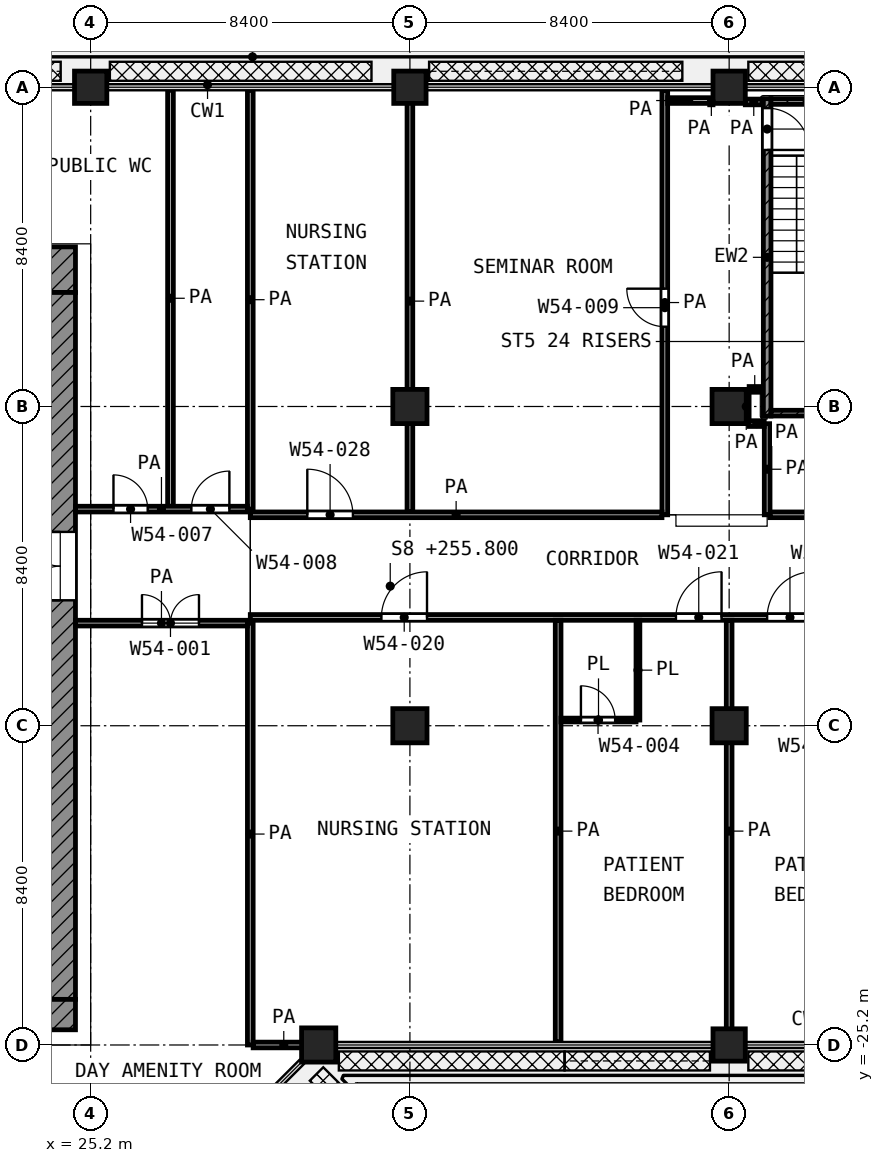
"""IFC4 building model, lengths in metres.
Left out: names, types, materials, properties, quantities, classifications, styles, units other than length and angle.
Written with IfcOpenShell. Run it as: python <this file> out.ifc"""

import sys

from ifc_helpers import new_model, si_unit, direction, frame, frame_2d, origin, origin_2d, place, context, subcontext, project, spatial, rectangle, extrude, element, fill, save


model = new_model("IFC4")
c1 = context("Model", 3, precision=1e-05, world=origin(), true_north=direction((0.0, 1.0)))
c2 = subcontext(c1, "Body", "Model", "MODEL_VIEW")
j1 = project(units=[si_unit("LENGTHUNIT", "METRE"), si_unit("PLANEANGLEUNIT", "RADIAN")], contexts=[c1])
p1 = place(None, origin())
s1 = spatial("IfcSite", under=j1, at=p1, CompositionType="ELEMENT")
p2 = place(p1, origin())
s2 = spatial("IfcBuilding", under=s1, at=p2, CompositionType="ELEMENT")
p3 = place(p2, frame((0.0, 0.0, 255.8)))
s3 = spatial("IfcBuildingStorey", under=s2, at=p3, CompositionType="ELEMENT", Elevation=255.8)
for number, where, z_axis, x_axis in (
    (1, (25.2, 0.0, 0.0), (0.0, 0.0, 1.0), (1.0, 0.0, 0.0)),
    (2, (33.6, 0.0, 0.0), (0.0, 0.0, 1.0), (1.0, 0.0, 0.0)),
    (3, (42.0, 0.0, 0.0), (0.0, 0.0, 1.0), (1.0, 0.0, 0.0)),
):
    element("IfcColumn", number, at=place(p3, frame(where, z_axis=z_axis, x_axis=x_axis)), inside=s3, PredefinedType="COLUMN", context=c2, shape_type="SweptSolid", body=[
        extrude(rectangle(XDim=0.85, YDim=0.85, at=origin_2d()), origin(), (0.0, 0.0, 1.0), 4.2),
    ])
for number, where, z_axis, x_axis in (
    (4, (33.6, -8.4, 0.0), (0.0, 0.0, 1.0), (1.0, 0.0, 0.0)),
    (5, (42.0, -8.4, 0.0), (0.0, 0.0, 1.0), (1.0, 0.0, 0.0)),
    (6, (33.6, -16.8, 0.0), (0.0, 0.0, 1.0), (1.0, 0.0, 0.0)),
    (7, (42.0, -16.8, 0.0), (0.0, 0.0, 1.0), (1.0, 0.0, 0.0)),
    (8, (31.2, -25.2, 0.0), (0.0, 0.0, 1.0), (1.0, 0.0, 0.0)),
):
    element("IfcColumn", number, at=place(p3, frame(where, z_axis=z_axis, x_axis=x_axis)), inside=s3, PredefinedType="COLUMN", context=c2, shape_type="SweptSolid", body=[
        extrude(rectangle(XDim=0.9, YDim=0.9, at=origin_2d()), origin(), (0.0, 0.0, 1.0), 4.2),
    ])
p4 = place(p3, frame((42.0, -25.2, 0.0), z_axis=(0.0, 0.0, 1.0), x_axis=(1.0, 0.0, 0.0)))
e9 = element("IfcColumn", 9, at=p4, inside=s3, PredefinedType="COLUMN", context=c2, shape_type="SweptSolid", body=[
    extrude(rectangle(XDim=0.85, YDim=0.85, at=origin_2d()), origin(), (0.0, 0.0, 1.0), 4.2),
])
p5 = place(p3, frame((4.2, -4.8, 0.0), z_axis=(0.0, 0.0, 1.0), x_axis=(1.0, 0.0, 0.0)))
e10 = element("IfcWall", 10, at=p5, inside=s3, PredefinedType="SHEAR", context=c2, shape_type="SweptSolid", body=[
    extrude(rectangle(XDim=20.6, YDim=1.2, at=frame_2d((10.3, 0.0))), origin(), (0.0, 0.0, 1.0), 3.6),
])
p6 = place(p5, frame((1.95, 0.0, 0.0)))
e11 = element("IfcOpeningElement", 11, at=p6, cuts=e10, PredefinedType="OPENING", context=c2, shape_type="SweptSolid", body=[
    extrude(rectangle(XDim=1.1, YDim=2.1, at=frame_2d((0.55, 1.05))), frame((0.0, 0.61, 0.0), z_axis=(0.0, -1.0, 0.0), x_axis=(1.0, 0.0, 0.0)), (0.0, 0.0, 1.0), 1.22),
])
p7 = place(p5, frame((17.95, 0.0, 0.0)))
e12 = element("IfcOpeningElement", 12, at=p7, cuts=e10, PredefinedType="OPENING", context=c2, shape_type="SweptSolid", body=[
    extrude(rectangle(XDim=1.1, YDim=2.1, at=frame_2d((0.55, 1.05))), frame((0.0, 0.61, 0.0), z_axis=(0.0, -1.0, 0.0), x_axis=(1.0, 0.0, 0.0)), (0.0, 0.0, 1.0), 1.22),
])
p8 = place(p3, frame((24.4, -24.0, 0.0), z_axis=(0.0, 0.0, 1.0), x_axis=(0.0, 1.0, 0.0)))
e13 = element("IfcWall", 13, at=p8, inside=s3, PredefinedType="SHEAR", context=c2, shape_type="SweptSolid", body=[
    extrude(rectangle(XDim=18.6, YDim=0.8, at=frame_2d((9.3, 0.0))), origin(), (0.0, 0.0, 1.0), 3.6),
])
p9 = place(p8, frame((10.5, 0.0, 0.0)))
e14 = element("IfcOpeningElement", 14, at=p9, cuts=e13, PredefinedType="OPENING", context=c2, shape_type="SweptSolid", body=[
    extrude(rectangle(XDim=1.8, YDim=2.1, at=frame_2d((0.9, 1.05))), frame((0.0, 0.41, 0.0), z_axis=(0.0, -1.0, 0.0), x_axis=(1.0, 0.0, 0.0)), (0.0, 0.0, 1.0), 0.82),
])
p10 = place(p3, frame((24.4, -24.8, 0.0), z_axis=(0.0, 0.0, 1.0), x_axis=(0.0, 1.0, 0.0)))
e15 = element("IfcWall", 15, at=p10, inside=s3, PredefinedType="SHEAR", context=c2, shape_type="SweptSolid", body=[
    extrude(rectangle(XDim=0.8, YDim=0.8, at=frame_2d((0.4, 0.0))), origin(), (0.0, 0.0, 1.0), 3.6),
])
p11 = place(p3, frame((43.0, -8.65, 0.0), z_axis=(0.0, 0.0, 1.0), x_axis=(0.0, 1.0, 0.0)))
e16 = element("IfcWall", 16, at=p11, inside=s3, PredefinedType="SHEAR", context=c2, shape_type="SweptSolid", body=[
    extrude(rectangle(XDim=8.35, YDim=0.2, at=frame_2d((4.175, 0.0))), origin(), (0.0, 0.0, 1.0), 3.6),
])
p12 = place(p11, frame((7.0, 0.0, 0.0)))
e17 = element("IfcOpeningElement", 17, at=p12, cuts=e16, PredefinedType="OPENING", context=c2, shape_type="SweptSolid", body=[
    extrude(rectangle(XDim=1.1, YDim=2.1, at=frame_2d((0.55, 1.05))), frame((0.0, 0.11, 0.0), z_axis=(0.0, -1.0, 0.0), x_axis=(1.0, 0.0, 0.0)), (0.0, 0.0, 1.0), 0.22),
])
for number, where, z_axis, x_axis in (
    (18, (43.1, -0.375, 0.0), (0.0, 0.0, 1.0), (1.0, 0.0, 0.0)),
    (19, (43.1, -8.575, 0.0), (0.0, 0.0, 1.0), (1.0, 0.0, 0.0)),
):
    element("IfcWall", number, at=place(p3, frame(where, z_axis=z_axis, x_axis=x_axis)), inside=s3, PredefinedType="SHEAR", context=c2, shape_type="SweptSolid", body=[
        extrude(rectangle(XDim=2.85, YDim=0.15, at=frame_2d((1.425, 0.0))), origin(), (0.0, 0.0, 1.0), 3.6),
    ])
p13 = place(p3, frame((37.575, -16.65, 0.0), z_axis=(0.0, 0.0, 1.0), x_axis=(1.0, 0.0, 0.0)))
e20 = element("IfcWall", 20, at=p13, inside=s3, PredefinedType="PARTITIONING", context=c2, shape_type="SweptSolid", body=[
    extrude(rectangle(XDim=1.975, YDim=0.1, at=frame_2d((0.988, 0.0))), origin(), (0.0, 0.0, 1.0), 3.6),
])
p14 = place(p13, frame((0.525, 0.0, 0.0)))
e21 = element("IfcOpeningElement", 21, at=p14, cuts=e20, PredefinedType="OPENING", context=c2, shape_type="SweptSolid", body=[
    extrude(rectangle(XDim=0.9, YDim=2.1, at=frame_2d((0.45, 1.05))), frame((0.0, 0.06, 0.0), z_axis=(0.0, -1.0, 0.0), x_axis=(1.0, 0.0, 0.0)), (0.0, 0.0, 1.0), 0.12),
])
p15 = place(p3, frame((39.6, -16.65, 0.0), z_axis=(0.0, 0.0, 1.0), x_axis=(0.0, 1.0, 0.0)))
e22 = element("IfcWall", 22, at=p15, inside=s3, PredefinedType="PARTITIONING", context=c2, shape_type="SweptSolid", body=[
    extrude(rectangle(XDim=2.625, YDim=0.1, at=frame_2d((1.312, 0.0))), origin(), (0.0, 0.0, 1.0), 3.6),
])
p16 = place(p3, frame((29.475, -25.2, 0.0), z_axis=(0.0, 0.0, 1.0), x_axis=(1.0, 0.0, 0.0)))
e23 = element("IfcWall", 23, at=p16, inside=s3, PredefinedType="PARTITIONING", context=c2, shape_type="SweptSolid", body=[
    extrude(rectangle(XDim=1.612, YDim=0.15, at=frame_2d((0.806, 0.0))), origin(), (0.0, 0.0, 1.0), 3.6),
])
p17 = place(p3, frame((24.8, -14.1, 0.0), z_axis=(0.0, 0.0, 1.0), x_axis=(1.0, 0.0, 0.0)))
e24 = element("IfcWall", 24, at=p17, inside=s3, PredefinedType="PARTITIONING", context=c2, shape_type="SweptSolid", body=[
    extrude(rectangle(XDim=4.525, YDim=0.15, at=frame_2d((2.262, 0.0))), origin(), (0.0, 0.0, 1.0), 3.6),
])
p18 = place(p17, frame((1.75, 0.0, 0.0)))
e25 = element("IfcOpeningElement", 25, at=p18, cuts=e24, PredefinedType="OPENING", context=c2, shape_type="SweptSolid", body=[
    extrude(rectangle(XDim=1.5, YDim=2.1, at=frame_2d((0.75, 1.05))), frame((0.0, 0.085, 0.0), z_axis=(0.0, -1.0, 0.0), x_axis=(1.0, 0.0, 0.0)), (0.0, 0.0, 1.0), 0.17),
])
p19 = place(p3, frame((29.4, -13.95, 0.0), z_axis=(0.0, 0.0, 1.0), x_axis=(1.0, 0.0, 0.0)))
e26 = element("IfcWall", 26, at=p19, inside=s3, PredefinedType="PARTITIONING", context=c2, shape_type="SweptSolid", body=[
    extrude(rectangle(XDim=33.52, YDim=0.15, at=frame_2d((16.76, 0.0))), origin(), (0.0, 0.0, 1.0), 2.7),
])
p20 = place(p19, frame((3.45, 0.0, 0.0)))
e27 = element("IfcOpeningElement", 27, at=p20, cuts=e26, PredefinedType="OPENING", context=c2, shape_type="SweptSolid", body=[
    extrude(rectangle(XDim=1.2, YDim=2.1, at=frame_2d((0.6, 1.05))), frame((0.0, 0.085, 0.0), z_axis=(0.0, -1.0, 0.0), x_axis=(1.0, 0.0, 0.0)), (0.0, 0.0, 1.0), 0.17),
])
p21 = place(p19, frame((11.2, 0.0, 0.0)))
e28 = element("IfcOpeningElement", 28, at=p21, cuts=e26, PredefinedType="OPENING", context=c2, shape_type="SweptSolid", body=[
    extrude(rectangle(XDim=1.2, YDim=2.1, at=frame_2d((0.6, 1.05))), frame((0.0, 0.085, 0.0), z_axis=(0.0, -1.0, 0.0), x_axis=(1.0, 0.0, 0.0)), (0.0, 0.0, 1.0), 0.17),
])
p22 = place(p19, frame((13.6, 0.0, 0.0)))
e29 = element("IfcOpeningElement", 29, at=p22, cuts=e26, PredefinedType="OPENING", context=c2, shape_type="SweptSolid", body=[
    extrude(rectangle(XDim=1.2, YDim=2.1, at=frame_2d((0.6, 1.05))), frame((0.0, 0.085, 0.0), z_axis=(0.0, -1.0, 0.0), x_axis=(1.0, 0.0, 0.0)), (0.0, 0.0, 1.0), 0.17),
])
p23 = place(p19, frame((21.075, 0.0, 0.0)))
e30 = element("IfcOpeningElement", 30, at=p23, cuts=e26, PredefinedType="OPENING", context=c2, shape_type="SweptSolid", body=[
    extrude(rectangle(XDim=1.2, YDim=2.1, at=frame_2d((0.6, 1.05))), frame((0.0, 0.085, 0.0), z_axis=(0.0, -1.0, 0.0), x_axis=(1.0, 0.0, 0.0)), (0.0, 0.0, 1.0), 0.17),
])
p24 = place(p19, frame((19.55, 0.0, 0.0)))
e31 = element("IfcOpeningElement", 31, at=p24, cuts=e26, PredefinedType="OPENING", context=c2, shape_type="SweptSolid", body=[
    extrude(rectangle(XDim=1.2, YDim=2.1, at=frame_2d((0.6, 1.05))), frame((0.0, 0.085, 0.0), z_axis=(0.0, -1.0, 0.0), x_axis=(1.0, 0.0, 0.0)), (0.0, 0.0, 1.0), 0.17),
])
p25 = place(p19, frame((22.95, 0.0, 0.0)))
e32 = element("IfcOpeningElement", 32, at=p25, cuts=e26, PredefinedType="OPENING", context=c2, shape_type="SweptSolid", body=[
    extrude(rectangle(XDim=1.2, YDim=2.1, at=frame_2d((0.6, 1.05))), frame((0.0, 0.085, 0.0), z_axis=(0.0, -1.0, 0.0), x_axis=(1.0, 0.0, 0.0)), (0.0, 0.0, 1.0), 0.17),
])
p26 = place(p19, frame((28.35, 0.0, 0.0)))
e33 = element("IfcOpeningElement", 33, at=p26, cuts=e26, PredefinedType="OPENING", context=c2, shape_type="SweptSolid", body=[
    extrude(rectangle(XDim=1.5, YDim=2.1, at=frame_2d((0.75, 1.05))), frame((0.0, 0.085, 0.0), z_axis=(0.0, -1.0, 0.0), x_axis=(1.0, 0.0, 0.0)), (0.0, 0.0, 1.0), 0.17),
])
p27 = place(p3, frame((29.4, -11.25, 0.0), z_axis=(0.0, 0.0, 1.0), x_axis=(1.0, 0.0, 0.0)))
e34 = element("IfcWall", 34, at=p27, inside=s3, PredefinedType="PARTITIONING", context=c2, shape_type="SweptSolid", body=[
    extrude(rectangle(XDim=10.832, YDim=0.15, at=frame_2d((5.416, 0.0))), origin(), (0.0, 0.0, 1.0), 3.6),
])
p28 = place(p27, frame((1.5, 0.0, 0.0)))
e35 = element("IfcOpeningElement", 35, at=p28, cuts=e34, PredefinedType="OPENING", context=c2, shape_type="SweptSolid", body=[
    extrude(rectangle(XDim=1.2, YDim=2.1, at=frame_2d((0.6, 1.05))), frame((0.0, 0.085, 0.0), z_axis=(0.0, -1.0, 0.0), x_axis=(1.0, 0.0, 0.0)), (0.0, 0.0, 1.0), 0.17),
])
p29 = place(p3, frame((43.075, -11.25, 0.0), z_axis=(0.0, 0.0, 1.0), x_axis=(1.0, 0.0, 0.0)))
e36 = element("IfcWall", 36, at=p29, inside=s3, PredefinedType="PARTITIONING", context=c2, shape_type="SweptSolid", body=[
    extrude(rectangle(XDim=5.375, YDim=0.15, at=frame_2d((2.688, 0.0))), origin(), (0.0, 0.0, 1.0), 3.6),
])
p30 = place(p29, frame((2.188, 0.0, 0.0)))
e37 = element("IfcOpeningElement", 37, at=p30, cuts=e36, PredefinedType="OPENING", context=c2, shape_type="SweptSolid", body=[
    extrude(rectangle(XDim=1.0, YDim=2.1, at=frame_2d((0.5, 1.05))), frame((0.0, 0.085, 0.0), z_axis=(0.0, -1.0, 0.0), x_axis=(1.0, 0.0, 0.0)), (0.0, 0.0, 1.0), 0.17),
])
p31 = place(p3, frame((24.8, -11.1, 0.0), z_axis=(0.0, 0.0, 1.0), x_axis=(1.0, 0.0, 0.0)))
e38 = element("IfcWall", 38, at=p31, inside=s3, PredefinedType="PARTITIONING", context=c2, shape_type="SweptSolid", body=[
    extrude(rectangle(XDim=4.525, YDim=0.15, at=frame_2d((2.262, 0.0))), origin(), (0.0, 0.0, 1.0), 3.6),
])
p32 = place(p31, frame((1.0, 0.0, 0.0)))
e39 = element("IfcOpeningElement", 39, at=p32, cuts=e38, PredefinedType="OPENING", context=c2, shape_type="SweptSolid", body=[
    extrude(rectangle(XDim=0.9, YDim=2.1, at=frame_2d((0.45, 1.05))), frame((0.0, 0.085, 0.0), z_axis=(0.0, -1.0, 0.0), x_axis=(1.0, 0.0, 0.0)), (0.0, 0.0, 1.0), 0.17),
])
p33 = place(p31, frame((3.05, 0.0, 0.0)))
e40 = element("IfcOpeningElement", 40, at=p33, cuts=e38, PredefinedType="OPENING", context=c2, shape_type="SweptSolid", body=[
    extrude(rectangle(XDim=1.0, YDim=2.1, at=frame_2d((0.5, 1.05))), frame((0.0, 0.085, 0.0), z_axis=(0.0, -1.0, 0.0), x_axis=(1.0, 0.0, 0.0)), (0.0, 0.0, 1.0), 0.17),
])
p34 = place(p3, frame((42.525, -8.85, 0.0), z_axis=(0.0, 0.0, 1.0), x_axis=(1.0, 0.0, 0.0)))
e41 = element("IfcWall", 41, at=p34, inside=s3, PredefinedType="PARTITIONING", context=c2, shape_type="SweptSolid", body=[
    extrude(rectangle(XDim=0.398, YDim=0.15, at=frame_2d((0.199, 0.0))), origin(), (0.0, 0.0, 1.0), 3.6),
])
p35 = place(p3, frame((42.526, -7.95, 0.0), z_axis=(0.0, 0.0, 1.0), x_axis=(1.0, 0.0, 0.0)))
e42 = element("IfcWall", 42, at=p35, inside=s3, PredefinedType="PARTITIONING", context=c2, shape_type="SweptSolid", body=[
    extrude(rectangle(XDim=0.294, YDim=0.15, at=frame_2d((0.147, 0.0))), origin(), (0.0, 0.0, 1.0), 3.6),
])
p36 = place(p3, frame((41.488, -0.387, 0.0), z_axis=(0.0, 0.0, 1.0), x_axis=(1.0, 0.0, 0.0)))
e43 = element("IfcWall", 43, at=p36, inside=s3, PredefinedType="PARTITIONING", context=c2, shape_type="SweptSolid", body=[
    extrude(rectangle(XDim=0.087, YDim=0.15, at=frame_2d((0.043, 0.0))), origin(), (0.0, 0.0, 1.0), 3.6),
])
p37 = place(p3, frame((42.425, -0.387, 0.0), z_axis=(0.0, 0.0, 1.0), x_axis=(1.0, 0.0, 0.0)))
e44 = element("IfcWall", 44, at=p37, inside=s3, PredefinedType="PARTITIONING", context=c2, shape_type="SweptSolid", body=[
    extrude(rectangle(XDim=0.445, YDim=0.15, at=frame_2d((0.223, 0.0))), origin(), (0.0, 0.0, 1.0), 3.6),
])
p38 = place(p3, frame((40.382, -0.35, 0.0), z_axis=(0.0, 0.0, 1.0), x_axis=(1.0, 0.0, 0.0)))
e45 = element("IfcWall", 45, at=p38, inside=s3, PredefinedType="PARTITIONING", context=c2, shape_type="SweptSolid", body=[
    extrude(rectangle(XDim=1.106, YDim=0.15, at=frame_2d((0.553, 0.0))), origin(), (0.0, 0.0, 1.0), 3.6),
])
p39 = place(p3, frame((27.3, -11.025, 0.0), z_axis=(0.0, 0.0, 1.0), x_axis=(0.0, 1.0, 0.0)))
e46 = element("IfcWall", 46, at=p39, inside=s3, PredefinedType="PARTITIONING", context=c2, shape_type="SweptSolid", body=[
    extrude(rectangle(XDim=10.945, YDim=0.15, at=frame_2d((5.472, 0.0))), origin(), (0.0, 0.0, 1.0), 3.6),
])
p40 = place(p3, frame((29.4, -25.2, 0.0), z_axis=(0.0, 0.0, 1.0), x_axis=(0.0, 1.0, 0.0)))
e47 = element("IfcWall", 47, at=p40, inside=s3, PredefinedType="PARTITIONING", context=c2, shape_type="SweptSolid", body=[
    extrude(rectangle(XDim=11.1, YDim=0.15, at=frame_2d((5.55, 0.0))), origin(), (0.0, 0.0, 1.0), 3.6),
])
p41 = place(p3, frame((29.4, -11.1, 0.0), z_axis=(0.0, 0.0, 1.0), x_axis=(0.0, 1.0, 0.0)))
e48 = element("IfcWall", 48, at=p41, inside=s3, PredefinedType="PARTITIONING", context=c2, shape_type="SweptSolid", body=[
    extrude(rectangle(XDim=11.02, YDim=0.15, at=frame_2d((5.51, 0.0))), origin(), (0.0, 0.0, 1.0), 3.6),
])
p42 = place(p3, frame((33.6, -11.175, 0.0), z_axis=(0.0, 0.0, 1.0), x_axis=(0.0, 1.0, 0.0)))
e49 = element("IfcWall", 49, at=p42, inside=s3, PredefinedType="PARTITIONING", context=c2, shape_type="SweptSolid", body=[
    extrude(rectangle(XDim=11.095, YDim=0.15, at=frame_2d((5.547, 0.0))), origin(), (0.0, 0.0, 1.0), 3.6),
])
p43 = place(p3, frame((37.5, -25.12, 0.0), z_axis=(0.0, 0.0, 1.0), x_axis=(0.0, 1.0, 0.0)))
e50 = element("IfcWall", 50, at=p43, inside=s3, PredefinedType="PARTITIONING", context=c2, shape_type="SweptSolid", body=[
    extrude(rectangle(XDim=11.095, YDim=0.15, at=frame_2d((5.548, 0.0))), origin(), (0.0, 0.0, 1.0), 3.6),
])
p44 = place(p3, frame((40.307, -11.25, 0.0), z_axis=(0.0, 0.0, 1.0), x_axis=(0.0, 1.0, 0.0)))
e51 = element("IfcWall", 51, at=p44, inside=s3, PredefinedType="PARTITIONING", context=c2, shape_type="SweptSolid", body=[
    extrude(rectangle(XDim=11.17, YDim=0.15, at=frame_2d((5.585, 0.0))), origin(), (0.0, 0.0, 1.0), 3.6),
])
p45 = place(p44, frame((4.95, 0.0, 0.0)))
e52 = element("IfcOpeningElement", 52, at=p45, cuts=e51, PredefinedType="OPENING", context=c2, shape_type="SweptSolid", body=[
    extrude(rectangle(XDim=1.0, YDim=2.1, at=frame_2d((0.5, 1.05))), frame((0.0, 0.085, 0.0), z_axis=(0.0, -1.0, 0.0), x_axis=(1.0, 0.0, 0.0)), (0.0, 0.0, 1.0), 0.17),
])
p46 = place(p3, frame((42.0, -25.12, 0.0), z_axis=(0.0, 0.0, 1.0), x_axis=(0.0, 1.0, 0.0)))
e53 = element("IfcWall", 53, at=p46, inside=s3, PredefinedType="PARTITIONING", context=c2, shape_type="SweptSolid", body=[
    extrude(rectangle(XDim=11.095, YDim=0.15, at=frame_2d((5.548, 0.0))), origin(), (0.0, 0.0, 1.0), 3.6),
])
p47 = place(p3, frame((42.45, -8.85, 0.0), z_axis=(0.0, 0.0, 1.0), x_axis=(0.0, 1.0, 0.0)))
e54 = element("IfcWall", 54, at=p47, inside=s3, PredefinedType="PARTITIONING", context=c2, shape_type="SweptSolid", body=[
    extrude(rectangle(XDim=0.899, YDim=0.15, at=frame_2d((0.45, 0.0))), origin(), (0.0, 0.0, 1.0), 3.6),
])
p48 = place(p3, frame((43.0, -11.25, 0.0), z_axis=(0.0, 0.0, 1.0), x_axis=(0.0, 1.0, 0.0)))
e55 = element("IfcWall", 55, at=p48, inside=s3, PredefinedType="PARTITIONING", context=c2, shape_type="SweptSolid", body=[
    extrude(rectangle(XDim=2.398, YDim=0.15, at=frame_2d((1.199, 0.0))), origin(), (0.0, 0.0, 1.0), 3.6),
])
p49 = place(p9, origin())
e56 = element("IfcDoor", 56, at=p49, inside=s3, OperationType="DOUBLE_DOOR_SINGLE_SWING", PredefinedType="DOOR", context=c2, shape_type="SweptSolid", body=[
    extrude(rectangle(XDim=1.8, YDim=2.1, at=frame_2d((0.9, 1.05))), frame((0.0, 0.025, 0.0), z_axis=(0.0, -1.0, 0.0), x_axis=(1.0, 0.0, 0.0)), (0.0, 0.0, 1.0), 0.05),
])
fill(e14, e56)
p50 = place(p12, frame((1.1, 0.0, 0.0), z_axis=(0.0, 0.0, 1.0), x_axis=(-1.0, 0.0, 0.0)))
e57 = element("IfcDoor", 57, at=p50, inside=s3, OperationType="SINGLE_SWING_LEFT", PredefinedType="DOOR", context=c2, shape_type="SweptSolid", body=[
    extrude(rectangle(XDim=1.1, YDim=2.1, at=frame_2d((0.55, 1.05))), frame((0.0, 0.025, 0.0), z_axis=(0.0, -1.0, 0.0), x_axis=(1.0, 0.0, 0.0)), (0.0, 0.0, 1.0), 0.05),
])
fill(e17, e57)
p51 = place(p18, origin())
e58 = element("IfcDoor", 58, at=p51, inside=s3, OperationType="DOUBLE_DOOR_SINGLE_SWING", PredefinedType="DOOR", context=c2, shape_type="SweptSolid", body=[
    extrude(rectangle(XDim=1.5, YDim=2.1, at=frame_2d((0.75, 1.05))), frame((0.0, 0.025, 0.0), z_axis=(0.0, -1.0, 0.0), x_axis=(1.0, 0.0, 0.0)), (0.0, 0.0, 1.0), 0.05),
])
fill(e25, e58)
p52 = place(p45, origin())
e59 = element("IfcDoor", 59, at=p52, inside=s3, OperationType="SINGLE_SWING_RIGHT", PredefinedType="DOOR", context=c2, shape_type="SweptSolid", body=[
    extrude(rectangle(XDim=1.0, YDim=2.1, at=frame_2d((0.5, 1.05))), frame((0.0, 0.025, 0.0), z_axis=(0.0, -1.0, 0.0), x_axis=(1.0, 0.0, 0.0)), (0.0, 0.0, 1.0), 0.05),
])
fill(e52, e59)
p53 = place(p20, origin())
e60 = element("IfcDoor", 60, at=p53, inside=s3, OperationType="SINGLE_SWING_RIGHT", PredefinedType="DOOR", context=c2, shape_type="SweptSolid", body=[
    extrude(rectangle(XDim=1.2, YDim=2.1, at=frame_2d((0.6, 1.05))), frame((0.0, 0.025, 0.0), z_axis=(0.0, -1.0, 0.0), x_axis=(1.0, 0.0, 0.0)), (0.0, 0.0, 1.0), 0.05),
])
fill(e27, e60)
p54 = place(p21, origin())
e61 = element("IfcDoor", 61, at=p54, inside=s3, OperationType="SINGLE_SWING_RIGHT", PredefinedType="DOOR", context=c2, shape_type="SweptSolid", body=[
    extrude(rectangle(XDim=1.2, YDim=2.1, at=frame_2d((0.6, 1.05))), frame((0.0, 0.025, 0.0), z_axis=(0.0, -1.0, 0.0), x_axis=(1.0, 0.0, 0.0)), (0.0, 0.0, 1.0), 0.05),
])
fill(e28, e61)
p55 = place(p14, origin())
e62 = element("IfcDoor", 62, at=p55, inside=s3, OperationType="SINGLE_SWING_LEFT", PredefinedType="DOOR", context=c2, shape_type="SweptSolid", body=[
    extrude(rectangle(XDim=0.9, YDim=2.1, at=frame_2d((0.45, 1.05))), frame((0.0, 0.025, 0.0), z_axis=(0.0, -1.0, 0.0), x_axis=(1.0, 0.0, 0.0)), (0.0, 0.0, 1.0), 0.05),
])
fill(e21, e62)
p56 = place(p22, origin())
e63 = element("IfcDoor", 63, at=p56, inside=s3, OperationType="SINGLE_SWING_RIGHT", PredefinedType="DOOR", context=c2, shape_type="SweptSolid", body=[
    extrude(rectangle(XDim=1.2, YDim=2.1, at=frame_2d((0.6, 1.05))), frame((0.0, 0.025, 0.0), z_axis=(0.0, -1.0, 0.0), x_axis=(1.0, 0.0, 0.0)), (0.0, 0.0, 1.0), 0.05),
])
fill(e29, e63)
p57 = place(p32, origin())
e64 = element("IfcDoor", 64, at=p57, inside=s3, OperationType="SINGLE_SWING_LEFT", PredefinedType="DOOR", context=c2, shape_type="SweptSolid", body=[
    extrude(rectangle(XDim=0.9, YDim=2.1, at=frame_2d((0.45, 1.05))), frame((0.0, 0.025, 0.0), z_axis=(0.0, -1.0, 0.0), x_axis=(1.0, 0.0, 0.0)), (0.0, 0.0, 1.0), 0.05),
])
fill(e39, e64)
p58 = place(p33, origin())
e65 = element("IfcDoor", 65, at=p58, inside=s3, OperationType="SINGLE_SWING_RIGHT", PredefinedType="DOOR", context=c2, shape_type="SweptSolid", body=[
    extrude(rectangle(XDim=1.0, YDim=2.1, at=frame_2d((0.5, 1.05))), frame((0.0, 0.025, 0.0), z_axis=(0.0, -1.0, 0.0), x_axis=(1.0, 0.0, 0.0)), (0.0, 0.0, 1.0), 0.05),
])
fill(e40, e65)
p59 = place(p28, origin())
e66 = element("IfcDoor", 66, at=p59, inside=s3, OperationType="SINGLE_SWING_LEFT", PredefinedType="DOOR", context=c2, shape_type="SweptSolid", body=[
    extrude(rectangle(XDim=1.2, YDim=2.1, at=frame_2d((0.6, 1.05))), frame((0.0, 0.025, 0.0), z_axis=(0.0, -1.0, 0.0), x_axis=(1.0, 0.0, 0.0)), (0.0, 0.0, 1.0), 0.05),
])
fill(e35, e66)
save(model, sys.argv[1])
